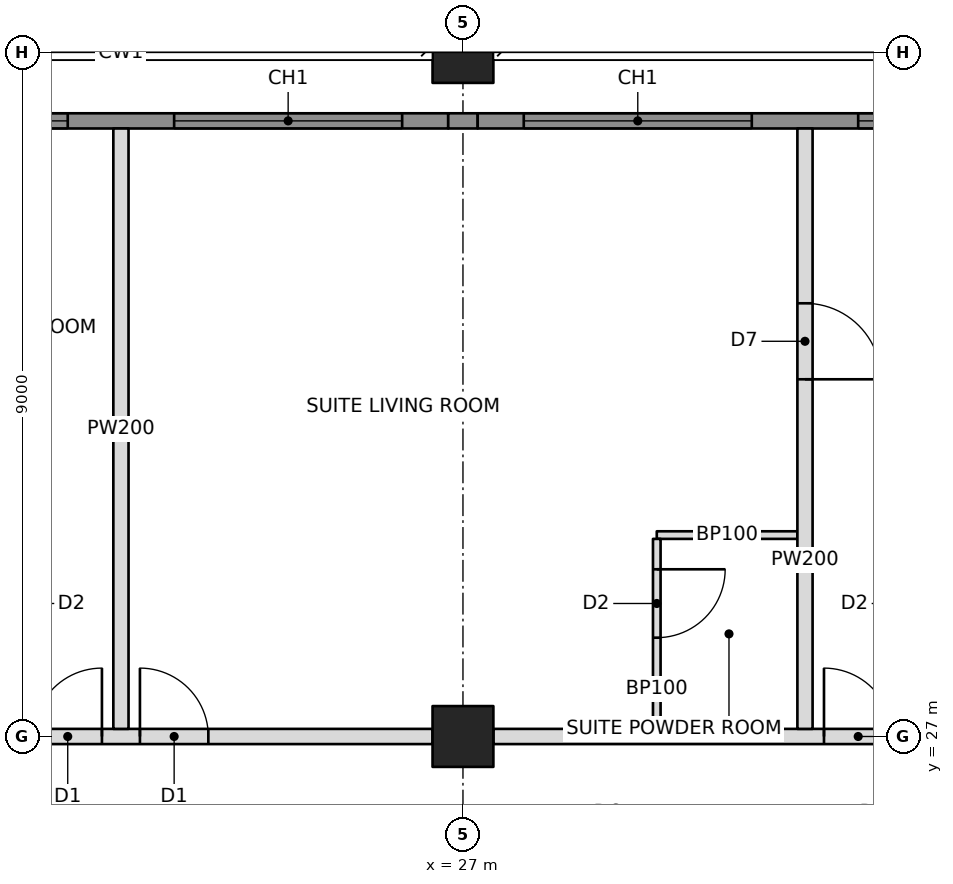
"""IFC4 building model, lengths in metres.
Left out: names, types, materials, properties, quantities, classifications, styles, units other than length and angle.
Written with IfcOpenShell. Run it as: python <this file> out.ifc"""

import sys

from ifc_helpers import new_model, si_unit, direction, frame, frame_2d, origin, origin_2d, place, context, subcontext, project, spatial, rectangle, hollow_rectangle, extrude, element, fill, save


model = new_model("IFC4")
c1 = context("Model", 3, precision=1e-05, world=origin(), true_north=direction((0.0, 1.0)))
c2 = subcontext(c1, "Body", "Model", "MODEL_VIEW")
j1 = project(units=[si_unit("LENGTHUNIT", "METRE"), si_unit("PLANEANGLEUNIT", "RADIAN")], contexts=[c1])
p1 = place(None, origin())
s1 = spatial("IfcSite", under=j1, at=p1, CompositionType="ELEMENT")
p2 = place(p1, origin())
s2 = spatial("IfcBuilding", under=s1, at=p2, CompositionType="ELEMENT")
p3 = place(p2, frame((0.0, 0.0, 148.6)))
s3 = spatial("IfcBuildingStorey", under=s2, at=p3, CompositionType="ELEMENT", Elevation=148.6)
p4 = place(p3, frame((27.0, 27.0, 0.0), z_axis=(0.0, 0.0, 1.0), x_axis=(1.0, 0.0, 0.0)))
e1 = element("IfcColumn", 1, at=p4, inside=s3, PredefinedType="COLUMN", context=c2, shape_type="SweptSolid", body=[
    extrude(hollow_rectangle(XDim=0.8, YDim=0.8, WallThickness=0.07, at=origin_2d()), origin(), (0.0, 0.0, 1.0), 3.4),
])
p5 = place(p3, frame((27.0, 36.0, 0.0), z_axis=(0.0, 0.0, 1.0), x_axis=(1.0, 0.0, 0.0)))
e2 = element("IfcColumn", 2, at=p5, inside=s3, PredefinedType="COLUMN", context=c2, shape_type="SweptSolid", body=[
    extrude(hollow_rectangle(XDim=0.8, YDim=0.8, WallThickness=0.06, at=origin_2d()), origin(), (0.0, 0.0, 1.0), 3.4),
])
p6 = place(p3, frame((18.4, 27.0, 0.0), z_axis=(0.0, 0.0, 1.0), x_axis=(1.0, 0.0, 0.0)))
e3 = element("IfcWall", 3, at=p6, inside=s3, PredefinedType="PARTITIONING", context=c2, shape_type="SweptSolid", body=[
    extrude(rectangle(XDim=8.2, YDim=0.2, at=frame_2d((4.1, 0.0))), origin(), (0.0, 0.0, 1.0), 2.405),
])
p7 = place(p6, frame((2.95, 0.0, 0.0)))
e4 = element("IfcOpeningElement", 4, at=p7, cuts=e3, PredefinedType="OPENING", context=c2, shape_type="SweptSolid", body=[
    extrude(rectangle(XDim=0.9, YDim=2.1, at=frame_2d((0.45, 1.05))), frame((0.0, 0.11, 0.0), z_axis=(0.0, -1.0, 0.0), x_axis=(1.0, 0.0, 0.0)), (0.0, 0.0, 1.0), 0.22),
])
p8 = place(p6, frame((4.35, 0.0, 0.0)))
e5 = element("IfcOpeningElement", 5, at=p8, cuts=e3, PredefinedType="OPENING", context=c2, shape_type="SweptSolid", body=[
    extrude(rectangle(XDim=0.9, YDim=2.1, at=frame_2d((0.45, 1.05))), frame((0.0, 0.11, 0.0), z_axis=(0.0, -1.0, 0.0), x_axis=(1.0, 0.0, 0.0)), (0.0, 0.0, 1.0), 0.22),
])
p9 = place(p3, frame((27.4, 27.0, 0.0), z_axis=(0.0, 0.0, 1.0), x_axis=(1.0, 0.0, 0.0)))
e6 = element("IfcWall", 6, at=p9, inside=s3, PredefinedType="PARTITIONING", context=c2, shape_type="SweptSolid", body=[
    extrude(rectangle(XDim=8.2, YDim=0.2, at=frame_2d((4.1, 0.0))), origin(), (0.0, 0.0, 1.0), 2.405),
])
p10 = place(p9, frame((4.35, 0.0, 0.0)))
e7 = element("IfcOpeningElement", 7, at=p10, cuts=e6, PredefinedType="OPENING", context=c2, shape_type="SweptSolid", body=[
    extrude(rectangle(XDim=0.9, YDim=2.1, at=frame_2d((0.45, 1.05))), frame((0.0, 0.11, 0.0), z_axis=(0.0, -1.0, 0.0), x_axis=(1.0, 0.0, 0.0)), (0.0, 0.0, 1.0), 0.22),
])
p11 = place(p3, frame((22.5, 27.1, 0.0), z_axis=(0.0, 0.0, 1.0), x_axis=(0.0, 1.0, 0.0)))
e8 = element("IfcWall", 8, at=p11, inside=s3, PredefinedType="PARTITIONING", context=c2, shape_type="SweptSolid", body=[
    extrude(rectangle(XDim=7.9, YDim=0.2, at=frame_2d((3.95, 0.0))), origin(), (0.0, 0.0, 1.0), 2.404),
])
p12 = place(p3, frame((31.5, 27.1, 0.0), z_axis=(0.0, 0.0, 1.0), x_axis=(0.0, 1.0, 0.0)))
e9 = element("IfcWall", 9, at=p12, inside=s3, PredefinedType="PARTITIONING", context=c2, shape_type="SweptSolid", body=[
    extrude(rectangle(XDim=7.9, YDim=0.2, at=frame_2d((3.95, 0.0))), origin(), (0.0, 0.0, 1.0), 2.404),
])
p13 = place(p12, frame((4.6, 0.0, 0.0)))
e10 = element("IfcOpeningElement", 10, at=p13, cuts=e9, PredefinedType="OPENING", context=c2, shape_type="SweptSolid", body=[
    extrude(rectangle(XDim=1.0, YDim=2.1, at=frame_2d((0.5, 1.05))), frame((0.0, 0.11, 0.0), z_axis=(0.0, -1.0, 0.0), x_axis=(1.0, 0.0, 0.0)), (0.0, 0.0, 1.0), 0.22),
])
p14 = place(p3, frame((29.55, 29.65, 0.0), z_axis=(0.0, 0.0, 1.0), x_axis=(1.0, 0.0, 0.0)))
e11 = element("IfcWall", 11, at=p14, inside=s3, PredefinedType="PARTITIONING", context=c2, shape_type="SweptSolid", body=[
    extrude(rectangle(XDim=1.85, YDim=0.1, at=frame_2d((0.925, 0.0))), origin(), (0.0, 0.0, 1.0), 3.2),
])
p15 = place(p3, frame((29.55, 27.1, 0.0), z_axis=(0.0, 0.0, 1.0), x_axis=(0.0, 1.0, 0.0)))
e12 = element("IfcWall", 12, at=p15, inside=s3, PredefinedType="PARTITIONING", context=c2, shape_type="SweptSolid", body=[
    extrude(rectangle(XDim=2.5, YDim=0.1, at=frame_2d((1.25, 0.0))), origin(), (0.0, 0.0, 1.0), 2.404),
])
p16 = place(p15, frame((1.2, 0.0, 0.0)))
e13 = element("IfcOpeningElement", 13, at=p16, cuts=e12, PredefinedType="OPENING", context=c2, shape_type="SweptSolid", body=[
    extrude(rectangle(XDim=0.9, YDim=2.1, at=frame_2d((0.45, 1.05))), frame((0.0, 0.06, 0.0), z_axis=(0.0, -1.0, 0.0), x_axis=(1.0, 0.0, 0.0)), (0.0, 0.0, 1.0), 0.12),
])
p17 = place(p3, frame((18.194, 35.1, 0.0), z_axis=(0.0, 0.0, 1.0), x_axis=(1.0, 0.0, 0.0)))
e14 = element("IfcWall", 14, at=p17, inside=s3, PredefinedType="SOLIDWALL", context=c2, shape_type="SweptSolid", body=[
    extrude(rectangle(XDim=8.612, YDim=0.2, at=frame_2d((4.306, 0.0))), origin(), (0.0, 0.0, 1.0), 3.2),
])
p18 = place(p17, frame((0.606, 0.0, 0.6)))
e15 = element("IfcOpeningElement", 15, at=p18, cuts=e14, PredefinedType="OPENING", context=c2, shape_type="SweptSolid", body=[
    extrude(rectangle(XDim=3.0, YDim=2.2, at=frame_2d((1.5, 1.1))), frame((0.0, 0.11, 0.0), z_axis=(0.0, -1.0, 0.0), x_axis=(1.0, 0.0, 0.0)), (0.0, 0.0, 1.0), 0.22),
])
p19 = place(p17, frame((5.006, 0.0, 0.6)))
e16 = element("IfcOpeningElement", 16, at=p19, cuts=e14, PredefinedType="OPENING", context=c2, shape_type="SweptSolid", body=[
    extrude(rectangle(XDim=3.0, YDim=2.2, at=frame_2d((1.5, 1.1))), frame((0.0, 0.11, 0.0), z_axis=(0.0, -1.0, 0.0), x_axis=(1.0, 0.0, 0.0)), (0.0, 0.0, 1.0), 0.22),
])
p20 = place(p3, frame((26.806, 35.1, 0.0), z_axis=(0.0, 0.0, 1.0), x_axis=(1.0, 0.0, 0.0)))
e17 = element("IfcWall", 17, at=p20, inside=s3, PredefinedType="SOLIDWALL", context=c2, shape_type="SweptSolid", body=[
    extrude(rectangle(XDim=0.388, YDim=0.2, at=frame_2d((0.194, 0.0))), origin(), (0.0, 0.0, 1.0), 2.404),
])
p21 = place(p3, frame((27.194, 35.1, 0.0), z_axis=(0.0, 0.0, 1.0), x_axis=(1.0, 0.0, 0.0)))
e18 = element("IfcWall", 18, at=p21, inside=s3, PredefinedType="SOLIDWALL", context=c2, shape_type="SweptSolid", body=[
    extrude(rectangle(XDim=8.671, YDim=0.2, at=frame_2d((4.335, 0.0))), origin(), (0.0, 0.0, 1.0), 3.2),
])
p22 = place(p21, frame((0.606, 0.0, 0.6)))
e19 = element("IfcOpeningElement", 19, at=p22, cuts=e18, PredefinedType="OPENING", context=c2, shape_type="SweptSolid", body=[
    extrude(rectangle(XDim=3.0, YDim=2.2, at=frame_2d((1.5, 1.1))), frame((0.0, 0.11, 0.0), z_axis=(0.0, -1.0, 0.0), x_axis=(1.0, 0.0, 0.0)), (0.0, 0.0, 1.0), 0.22),
])
p23 = place(p21, frame((5.006, 0.0, 0.6)))
e20 = element("IfcOpeningElement", 20, at=p23, cuts=e18, PredefinedType="OPENING", context=c2, shape_type="SweptSolid", body=[
    extrude(rectangle(XDim=3.0, YDim=2.2, at=frame_2d((1.5, 1.1))), frame((0.0, 0.11, 0.0), z_axis=(0.0, -1.0, 0.0), x_axis=(1.0, 0.0, 0.0)), (0.0, 0.0, 1.0), 0.22),
])
p24 = place(p18, origin())
e21 = element("IfcWindow", 21, at=p24, inside=s3, PartitioningType="TRIPLE_PANEL_VERTICAL", PredefinedType="WINDOW", context=c2, shape_type="SweptSolid", body=[
    extrude(rectangle(XDim=3.0, YDim=2.2, at=frame_2d((1.5, 1.1))), frame((0.0, 0.03, 0.0), z_axis=(0.0, -1.0, 0.0), x_axis=(1.0, 0.0, 0.0)), (0.0, 0.0, 1.0), 0.06),
])
fill(e15, e21)
p25 = place(p19, origin())
e22 = element("IfcWindow", 22, at=p25, inside=s3, PartitioningType="TRIPLE_PANEL_VERTICAL", PredefinedType="WINDOW", context=c2, shape_type="SweptSolid", body=[
    extrude(rectangle(XDim=3.0, YDim=2.2, at=frame_2d((1.5, 1.1))), frame((0.0, 0.03, 0.0), z_axis=(0.0, -1.0, 0.0), x_axis=(1.0, 0.0, 0.0)), (0.0, 0.0, 1.0), 0.06),
])
fill(e16, e22)
p26 = place(p22, origin())
e23 = element("IfcWindow", 23, at=p26, inside=s3, PartitioningType="TRIPLE_PANEL_VERTICAL", PredefinedType="WINDOW", context=c2, shape_type="SweptSolid", body=[
    extrude(rectangle(XDim=3.0, YDim=2.2, at=frame_2d((1.5, 1.1))), frame((0.0, 0.03, 0.0), z_axis=(0.0, -1.0, 0.0), x_axis=(1.0, 0.0, 0.0)), (0.0, 0.0, 1.0), 0.06),
])
fill(e19, e23)
p27 = place(p23, origin())
e24 = element("IfcWindow", 24, at=p27, inside=s3, PartitioningType="TRIPLE_PANEL_VERTICAL", PredefinedType="WINDOW", context=c2, shape_type="SweptSolid", body=[
    extrude(rectangle(XDim=3.0, YDim=2.2, at=frame_2d((1.5, 1.1))), frame((0.0, 0.03, 0.0), z_axis=(0.0, -1.0, 0.0), x_axis=(1.0, 0.0, 0.0)), (0.0, 0.0, 1.0), 0.06),
])
fill(e20, e24)
p28 = place(p13, frame((1.0, 0.0, 0.0), z_axis=(0.0, 0.0, 1.0), x_axis=(-1.0, 0.0, 0.0)))
e25 = element("IfcDoor", 25, at=p28, inside=s3, OperationType="SINGLE_SWING_RIGHT", PredefinedType="DOOR", context=c2, shape_type="SweptSolid", body=[
    extrude(rectangle(XDim=1.0, YDim=2.1, at=frame_2d((0.5, 1.05))), frame((0.0, 0.025, 0.0), z_axis=(0.0, -1.0, 0.0), x_axis=(1.0, 0.0, 0.0)), (0.0, 0.0, 1.0), 0.05),
])
fill(e10, e25)
p29 = place(p7, origin())
e26 = element("IfcDoor", 26, at=p29, inside=s3, OperationType="SINGLE_SWING_RIGHT", PredefinedType="DOOR", context=c2, shape_type="SweptSolid", body=[
    extrude(rectangle(XDim=0.9, YDim=2.1, at=frame_2d((0.45, 1.05))), frame((0.0, 0.025, 0.0), z_axis=(0.0, -1.0, 0.0), x_axis=(1.0, 0.0, 0.0)), (0.0, 0.0, 1.0), 0.05),
])
fill(e4, e26)
p30 = place(p16, frame((0.9, 0.0, 0.0), z_axis=(0.0, 0.0, 1.0), x_axis=(-1.0, 0.0, 0.0)))
e27 = element("IfcDoor", 27, at=p30, inside=s3, OperationType="SINGLE_SWING_LEFT", PredefinedType="DOOR", context=c2, shape_type="SweptSolid", body=[
    extrude(rectangle(XDim=0.9, YDim=2.1, at=frame_2d((0.45, 1.05))), frame((0.0, 0.025, 0.0), z_axis=(0.0, -1.0, 0.0), x_axis=(1.0, 0.0, 0.0)), (0.0, 0.0, 1.0), 0.05),
])
fill(e13, e27)
p31 = place(p8, origin())
e28 = element("IfcDoor", 28, at=p31, inside=s3, OperationType="SINGLE_SWING_LEFT", PredefinedType="DOOR", context=c2, shape_type="SweptSolid", body=[
    extrude(rectangle(XDim=0.9, YDim=2.1, at=frame_2d((0.45, 1.05))), frame((0.0, 0.025, 0.0), z_axis=(0.0, -1.0, 0.0), x_axis=(1.0, 0.0, 0.0)), (0.0, 0.0, 1.0), 0.05),
])
fill(e5, e28)
p32 = place(p10, origin())
e29 = element("IfcDoor", 29, at=p32, inside=s3, OperationType="SINGLE_SWING_LEFT", PredefinedType="DOOR", context=c2, shape_type="SweptSolid", body=[
    extrude(rectangle(XDim=0.9, YDim=2.1, at=frame_2d((0.45, 1.05))), frame((0.0, 0.025, 0.0), z_axis=(0.0, -1.0, 0.0), x_axis=(1.0, 0.0, 0.0)), (0.0, 0.0, 1.0), 0.05),
])
fill(e7, e29)
save(model, sys.argv[1])
